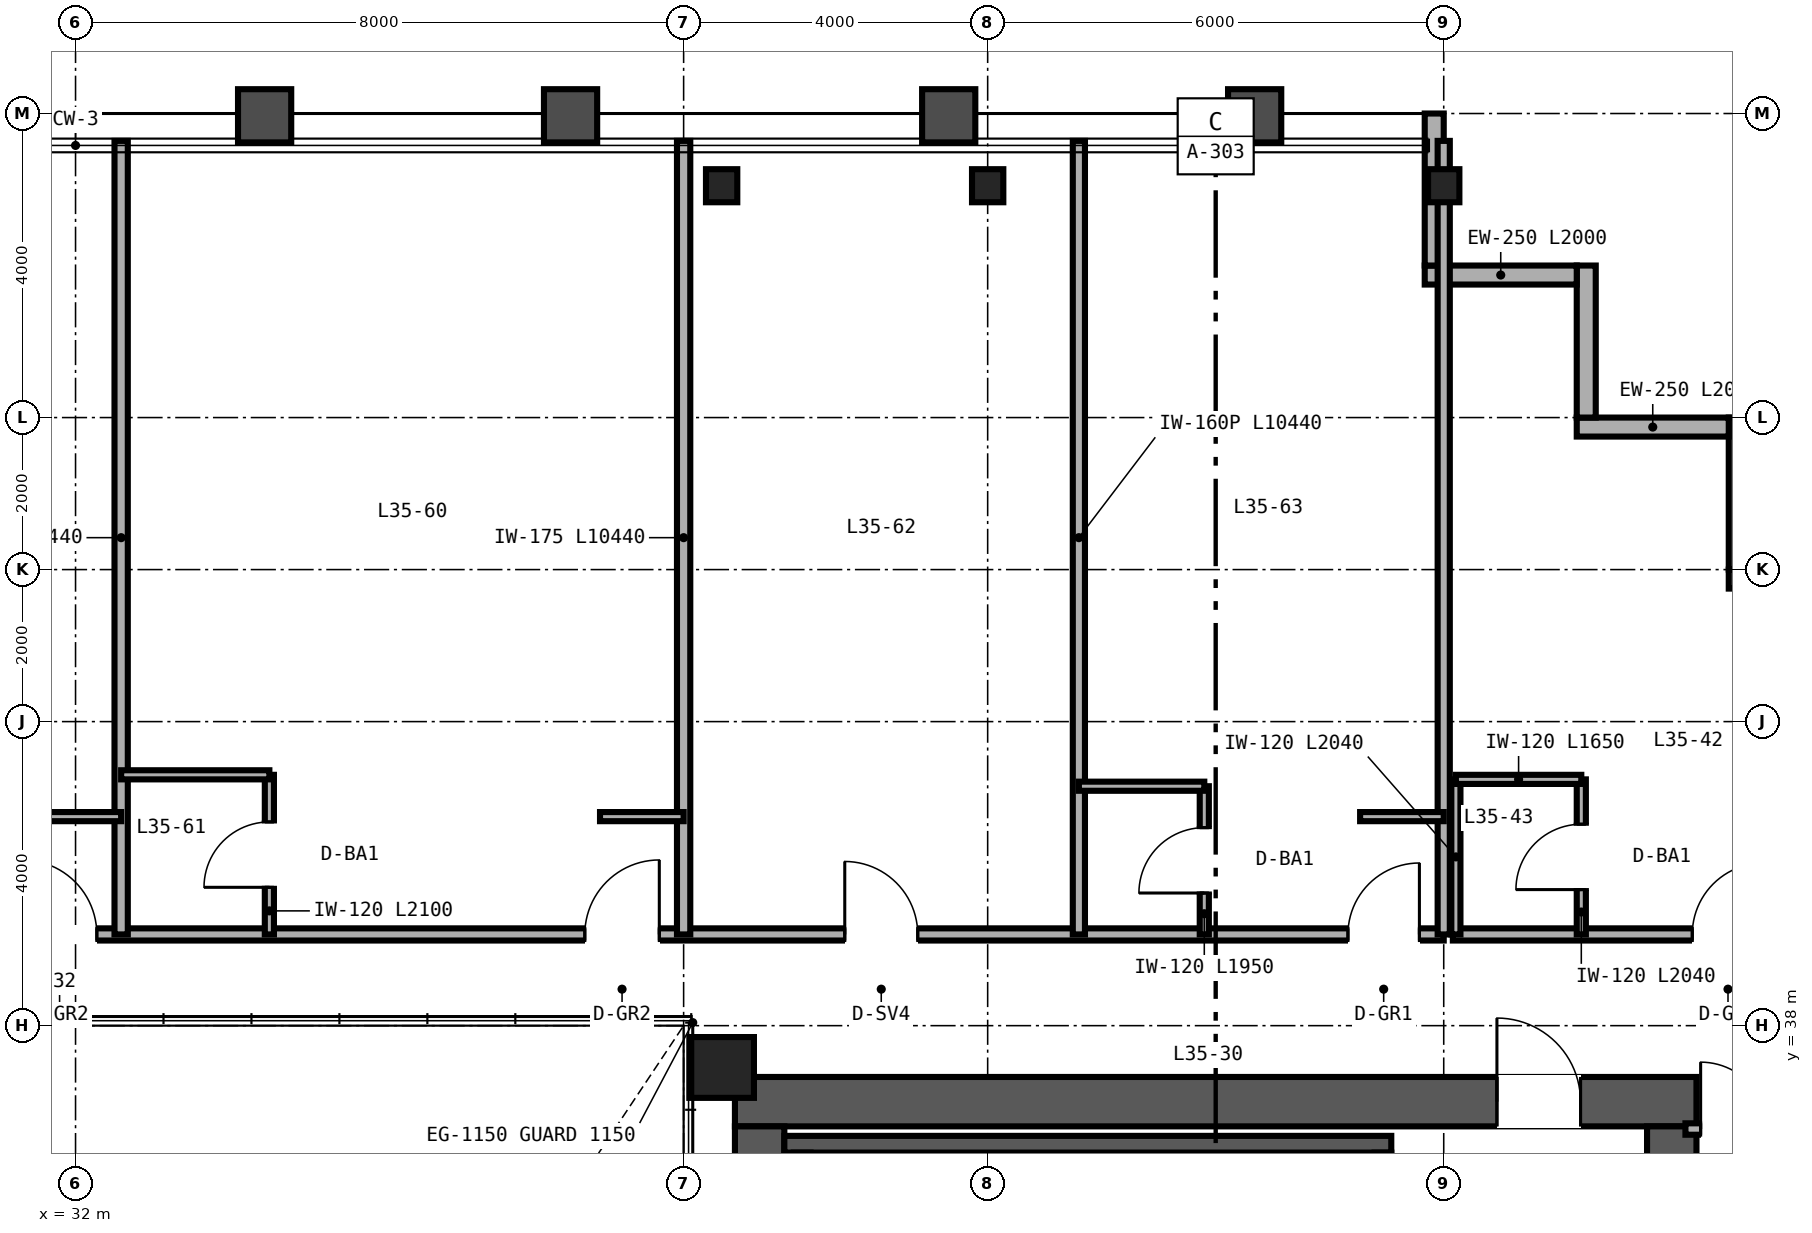
"""IFC4 building model, lengths in metres.
Left out: names, types, materials, properties, quantities, classifications, styles, units other than length and angle.
Written with IfcOpenShell. Run it as: python <this file> out.ifc"""

import sys

from ifc_helpers import new_model, si_unit, direction, frame, frame_2d, origin, origin_2d, place, context, subcontext, project, spatial, rectangle, hollow_rectangle, i_section, extrude, source, transform, mapped, element, fill, save


model = new_model("IFC4")
c1 = context("Model", 3, precision=1e-05, world=origin(), true_north=direction((0.0, 1.0)))
c2 = subcontext(c1, "Body", "Model", "MODEL_VIEW")
j1 = project(units=[si_unit("LENGTHUNIT", "METRE"), si_unit("PLANEANGLEUNIT", "RADIAN")], contexts=[c1])
p1 = place(None, origin())
s1 = spatial("IfcSite", under=j1, at=p1, CompositionType="ELEMENT")
p2 = place(p1, origin())
s2 = spatial("IfcBuilding", under=s1, at=p2, CompositionType="ELEMENT")
p3 = place(p2, frame((0.0, 0.0, 140.4)))
s3 = spatial("IfcBuildingStorey", under=s2, at=p3, CompositionType="ELEMENT", Elevation=140.4)
p4 = place(p3, frame((40.675, 37.0, 0.0), z_axis=(0.0, 0.0, 1.0), x_axis=(1.0, 0.0, 0.0)))
e1 = element("IfcWall", 1, at=p4, inside=s3, PredefinedType="SHEAR", context=c2, shape_type="SweptSolid", body=[
    extrude(rectangle(XDim=12.65, YDim=0.65, at=frame_2d((6.325, 0.0))), origin(), (0.0, 0.0, 1.0), 3.36),
])
p5 = place(p4, frame((10.025, 0.0, 0.0)))
e2 = element("IfcOpeningElement", 2, at=p5, cuts=e1, PredefinedType="OPENING", context=c2, shape_type="SweptSolid", body=[
    extrude(rectangle(XDim=1.1, YDim=2.15, at=frame_2d((0.55, 1.075))), frame((0.0, 0.335, 0.0), z_axis=(0.0, -1.0, 0.0), x_axis=(1.0, 0.0, 0.0)), (0.0, 0.0, 1.0), 0.67),
])
for number, where, z_axis, x_axis in (
    (3, (41.0, 15.325, 0.0), (0.0, 0.0, 1.0), (0.0, 1.0, 0.0)),
    (4, (53.0, 15.325, 0.0), (0.0, 0.0, 1.0), (0.0, 1.0, 0.0)),
):
    element("IfcWall", number, at=place(p3, frame(where, z_axis=z_axis, x_axis=x_axis)), inside=s3, PredefinedType="SHEAR", context=c2, shape_type="SweptSolid", body=[
        extrude(rectangle(XDim=21.35, YDim=0.65, at=frame_2d((10.675, 0.0))), origin(), (0.0, 0.0, 1.0), 3.36),
    ])
p6 = place(p3, frame((41.325, 36.44, 0.0), z_axis=(0.0, 0.0, 1.0), x_axis=(1.0, 0.0, 0.0)))
e5 = element("IfcWall", 5, at=p6, inside=s3, PredefinedType="SHEAR", context=c2, shape_type="SweptSolid", body=[
    extrude(rectangle(XDim=7.985, YDim=0.22, at=frame_2d((3.993, 0.0))), origin(), (0.0, 0.0, 1.0), 3.4),
])
for number, where, z_axis, x_axis in (
    (6, (41.56, 33.05, 0.0), (0.0, 0.0, 1.0), (0.0, 1.0, 0.0)),
    (7, (49.2, 33.05, 0.0), (0.0, 0.0, 1.0), (0.0, 1.0, 0.0)),
):
    element("IfcWall", number, at=place(p3, frame(where, z_axis=z_axis, x_axis=x_axis)), inside=s3, PredefinedType="SHEAR", context=c2, shape_type="SweptSolid", body=[
        extrude(rectangle(XDim=3.28, YDim=0.22, at=frame_2d((1.64, 0.0))), origin(), (0.0, 0.0, 1.0), 3.4),
    ])
m1 = source(origin(), c2, "Body", "SweptSolid", [
    extrude(hollow_rectangle(XDim=0.85, YDim=0.8, WallThickness=0.032, at=origin_2d()), origin(), (0.0, 0.0, 1.0), 3.36),
])
p7 = place(p3, frame((40.5, 37.45, 0.0), z_axis=(0.0, 0.0, 1.0), x_axis=(1.0, 0.0, 0.0)))
e8 = element("IfcColumn", 8, at=p7, inside=s3, PredefinedType="COLUMN", context=c2, shape_type="MappedRepresentation", body=[
    mapped(m1, transform((0.0, 0.0, 0.0), scale=1.0)),
])
m2 = source(origin(), c2, "Body", "SweptSolid", [
    extrude(i_section(OverallWidth=0.412, OverallDepth=0.435, WebThickness=0.036, FlangeThickness=0.057, FilletRadius=0.025, at=origin_2d()), origin(), (0.0, 0.0, 1.0), 3.36),
])
for number, where, z_axis, x_axis in (
    (9, (40.5, 49.05, 0.0), (0.0, 0.0, 1.0), (1.0, 0.0, 0.0)),
    (10, (44.0, 49.05, 0.0), (0.0, 0.0, 1.0), (1.0, 0.0, 0.0)),
    (11, (50.0, 49.05, 0.0), (0.0, 0.0, 1.0), (1.0, 0.0, 0.0)),
):
    element("IfcColumn", number, at=place(p3, frame(where, z_axis=z_axis, x_axis=x_axis)), inside=s3, PredefinedType="COLUMN", context=c2, shape_type="MappedRepresentation", body=[
        mapped(m2, transform((0.0, 0.0, 0.0), scale=1.0)),
    ])
p8 = place(p3, frame((56.0, 43.875, 0.0), z_axis=(0.0, 0.0, 1.0), x_axis=(-1.0, 0.0, 0.0)))
e12 = element("IfcWall", 12, at=p8, inside=s3, PredefinedType="SOLIDWALL", context=c2, shape_type="SweptSolid", body=[
    extrude(rectangle(XDim=2.25, YDim=0.25, at=frame_2d((1.125, 0.0))), origin(), (0.0, 0.0, 1.0), 3.36),
])
for number, where, z_axis, x_axis in (
    (13, (53.875, 44.0, 0.0), (0.0, 0.0, 1.0), (0.0, 1.0, 0.0)),
    (14, (53.75, 45.875, 0.0), (0.0, 0.0, 1.0), (-1.0, 0.0, 0.0)),
    (15, (51.875, 46.0, 0.0), (0.0, 0.0, 1.0), (0.0, 1.0, 0.0)),
    (16, (51.75, 47.875, 0.0), (0.0, 0.0, 1.0), (-1.0, 0.0, 0.0)),
):
    element("IfcWall", number, at=place(p3, frame(where, z_axis=z_axis, x_axis=x_axis)), inside=s3, PredefinedType="SOLIDWALL", context=c2, shape_type="SweptSolid", body=[
        extrude(rectangle(XDim=2.0, YDim=0.25, at=frame_2d((1.0, 0.0))), origin(), (0.0, 0.0, 1.0), 3.36),
    ])
p9 = place(p3, frame((49.875, 48.0, 0.0), z_axis=(0.0, 0.0, 1.0), x_axis=(0.0, 1.0, 0.0)))
e17 = element("IfcWall", 17, at=p9, inside=s3, PredefinedType="SOLIDWALL", context=c2, shape_type="SweptSolid", body=[
    extrude(rectangle(XDim=2.0, YDim=0.25, at=frame_2d((1.0, 0.0))), origin(), (0.0, 0.0, 1.0), 2.667),
])
p10 = place(p3, frame((53.18, 36.64, 0.0), z_axis=(0.0, 0.0, 1.0), x_axis=(1.0, 0.0, 0.0)))
e18 = element("IfcWall", 18, at=p10, inside=s3, PredefinedType="PARTITIONING", context=c2, shape_type="SweptSolid", body=[
    extrude(rectangle(XDim=2.66, YDim=0.15, at=frame_2d((1.33, 0.0))), origin(), (0.0, 0.0, 1.0), 2.743),
])
p11 = place(p10, frame((0.2, 0.0, 0.0)))
e19 = element("IfcOpeningElement", 19, at=p11, cuts=e18, PredefinedType="OPENING", context=c2, shape_type="SweptSolid", body=[
    extrude(rectangle(XDim=0.88, YDim=2.15, at=frame_2d((0.44, 1.075))), frame((0.0, 0.085, 0.0), z_axis=(0.0, -1.0, 0.0), x_axis=(1.0, 0.0, 0.0)), (0.0, 0.0, 1.0), 0.17),
])
p12 = place(p3, frame((50.12, 39.2, 0.0), z_axis=(0.0, 0.0, 1.0), x_axis=(1.0, 0.0, 0.0)))
e20 = element("IfcWall", 20, at=p12, inside=s3, PredefinedType="PARTITIONING", context=c2, shape_type="SweptSolid", body=[
    extrude(rectangle(XDim=5.68, YDim=0.16, at=frame_2d((2.84, 0.0))), origin(), (0.0, 0.0, 1.0), 3.36),
])
p13 = place(p12, frame((3.15, 0.0, 0.0)))
e21 = element("IfcOpeningElement", 21, at=p13, cuts=e20, PredefinedType="OPENING", context=c2, shape_type="SweptSolid", body=[
    extrude(rectangle(XDim=0.94, YDim=2.15, at=frame_2d((0.47, 1.075))), frame((0.0, 0.09, 0.0), z_axis=(0.0, -1.0, 0.0), x_axis=(1.0, 0.0, 0.0)), (0.0, 0.0, 1.0), 0.18),
])
p14 = place(p3, frame((51.81, 39.2, 0.0), z_axis=(0.0, 0.0, 1.0), x_axis=(0.0, 1.0, 0.0)))
e22 = element("IfcWall", 22, at=p14, inside=s3, PredefinedType="PARTITIONING", context=c2, shape_type="SweptSolid", body=[
    extrude(rectangle(XDim=2.04, YDim=0.12, at=frame_2d((1.02, 0.0))), origin(), (0.0, 0.0, 1.0), 3.36),
])
p15 = place(p14, frame((0.59, 0.0, 0.0)))
e23 = element("IfcOpeningElement", 23, at=p15, cuts=e22, PredefinedType="OPENING", context=c2, shape_type="SweptSolid", body=[
    extrude(rectangle(XDim=0.86, YDim=2.1, at=frame_2d((0.43, 1.05))), frame((0.0, 0.07, 0.0), z_axis=(0.0, -1.0, 0.0), x_axis=(1.0, 0.0, 0.0)), (0.0, 0.0, 1.0), 0.14),
])
p16 = place(p3, frame((50.16, 39.2, 0.0), z_axis=(0.0, 0.0, 1.0), x_axis=(0.0, 1.0, 0.0)))
e24 = element("IfcWall", 24, at=p16, inside=s3, PredefinedType="PARTITIONING", context=c2, shape_type="SweptSolid", body=[
    extrude(rectangle(XDim=2.04, YDim=0.12, at=frame_2d((1.02, 0.0))), origin(), (0.0, 0.0, 1.0), 3.36),
])
p17 = place(p3, frame((50.16, 41.24, 0.0), z_axis=(0.0, 0.0, 1.0), x_axis=(1.0, 0.0, 0.0)))
e25 = element("IfcWall", 25, at=p17, inside=s3, PredefinedType="PARTITIONING", context=c2, shape_type="SweptSolid", body=[
    extrude(rectangle(XDim=1.65, YDim=0.12, at=frame_2d((0.825, 0.0))), origin(), (0.0, 0.0, 1.0), 3.36),
])
p18 = place(p3, frame((14.0, 39.2, 0.0), z_axis=(0.0, 0.0, 1.0), x_axis=(1.0, 0.0, 0.0)))
e26 = element("IfcWall", 26, at=p18, inside=s3, PredefinedType="PARTITIONING", context=c2, shape_type="SweptSolid", body=[
    extrude(rectangle(XDim=36.0, YDim=0.16, at=frame_2d((18.0, 0.0))), origin(), (0.0, 0.0, 1.0), 2.581),
])
p19 = place(p18, frame((4.34, 0.0, 0.0)))
e27 = element("IfcOpeningElement", 27, at=p19, cuts=e26, PredefinedType="OPENING", context=c2, shape_type="SweptSolid", body=[
    extrude(rectangle(XDim=0.94, YDim=2.15, at=frame_2d((0.47, 1.075))), frame((0.0, 0.09, 0.0), z_axis=(0.0, -1.0, 0.0), x_axis=(1.0, 0.0, 0.0)), (0.0, 0.0, 1.0), 0.18),
])
p20 = place(p18, frame((9.94, 0.0, 0.0)))
e28 = element("IfcOpeningElement", 28, at=p20, cuts=e26, PredefinedType="OPENING", context=c2, shape_type="SweptSolid", body=[
    extrude(rectangle(XDim=0.94, YDim=2.15, at=frame_2d((0.47, 1.075))), frame((0.0, 0.09, 0.0), z_axis=(0.0, -1.0, 0.0), x_axis=(1.0, 0.0, 0.0)), (0.0, 0.0, 1.0), 0.18),
])
p21 = place(p18, frame((17.3, 0.0, 0.0)))
e29 = element("IfcOpeningElement", 29, at=p21, cuts=e26, PredefinedType="OPENING", context=c2, shape_type="SweptSolid", body=[
    extrude(rectangle(XDim=0.98, YDim=2.2, at=frame_2d((0.49, 1.1))), frame((0.0, 0.09, 0.0), z_axis=(0.0, -1.0, 0.0), x_axis=(1.0, 0.0, 0.0)), (0.0, 0.0, 1.0), 0.18),
])
p22 = place(p18, frame((24.7, 0.0, 0.0)))
e30 = element("IfcOpeningElement", 30, at=p22, cuts=e26, PredefinedType="OPENING", context=c2, shape_type="SweptSolid", body=[
    extrude(rectangle(XDim=0.98, YDim=2.2, at=frame_2d((0.49, 1.1))), frame((0.0, 0.09, 0.0), z_axis=(0.0, -1.0, 0.0), x_axis=(1.0, 0.0, 0.0)), (0.0, 0.0, 1.0), 0.18),
])
p23 = place(p18, frame((28.12, 0.0, 0.0)))
e31 = element("IfcOpeningElement", 31, at=p23, cuts=e26, PredefinedType="OPENING", context=c2, shape_type="SweptSolid", body=[
    extrude(rectangle(XDim=0.96, YDim=2.15, at=frame_2d((0.48, 1.075))), frame((0.0, 0.09, 0.0), z_axis=(0.0, -1.0, 0.0), x_axis=(1.0, 0.0, 0.0)), (0.0, 0.0, 1.0), 0.18),
])
p24 = place(p18, frame((34.74, 0.0, 0.0)))
e32 = element("IfcOpeningElement", 32, at=p24, cuts=e26, PredefinedType="OPENING", context=c2, shape_type="SweptSolid", body=[
    extrude(rectangle(XDim=0.94, YDim=2.15, at=frame_2d((0.47, 1.075))), frame((0.0, 0.09, 0.0), z_axis=(0.0, -1.0, 0.0), x_axis=(1.0, 0.0, 0.0)), (0.0, 0.0, 1.0), 0.18),
])
p25 = place(p3, frame((50.0, 39.2, 0.0), z_axis=(0.0, 0.0, 1.0), x_axis=(0.0, 1.0, 0.0)))
e33 = element("IfcWall", 33, at=p25, inside=s3, PredefinedType="PARTITIONING", context=c2, shape_type="SweptSolid", body=[
    extrude(rectangle(XDim=10.44, YDim=0.16, at=frame_2d((5.22, 0.0))), origin(), (0.0, 0.0, 1.0), 2.667),
])
p26 = place(p3, frame((32.6, 39.2, 0.0), z_axis=(0.0, 0.0, 1.0), x_axis=(0.0, 1.0, 0.0)))
e34 = element("IfcWall", 34, at=p26, inside=s3, PredefinedType="PARTITIONING", context=c2, shape_type="SweptSolid", body=[
    extrude(rectangle(XDim=10.44, YDim=0.175, at=frame_2d((5.22, 0.0))), origin(), (0.0, 0.0, 1.0), 2.433),
])
p27 = place(p3, frame((31.5, 40.75, 0.0), z_axis=(0.0, 0.0, 1.0), x_axis=(1.0, 0.0, 0.0)))
e35 = element("IfcWall", 35, at=p27, inside=s3, PredefinedType="PARTITIONING", context=c2, shape_type="SweptSolid", body=[
    extrude(rectangle(XDim=1.1, YDim=0.12, at=frame_2d((0.55, 0.0))), origin(), (0.0, 0.0, 1.0), 3.36),
])
p28 = place(p3, frame((40.0, 39.2, 0.0), z_axis=(0.0, 0.0, 1.0), x_axis=(0.0, 1.0, 0.0)))
e36 = element("IfcWall", 36, at=p28, inside=s3, PredefinedType="PARTITIONING", context=c2, shape_type="SweptSolid", body=[
    extrude(rectangle(XDim=10.44, YDim=0.175, at=frame_2d((5.22, 0.0))), origin(), (0.0, 0.0, 1.0), 2.433),
])
p29 = place(p3, frame((34.55, 39.2, 0.0), z_axis=(0.0, 0.0, 1.0), x_axis=(0.0, 1.0, 0.0)))
e37 = element("IfcWall", 37, at=p29, inside=s3, PredefinedType="PARTITIONING", context=c2, shape_type="SweptSolid", body=[
    extrude(rectangle(XDim=2.1, YDim=0.12, at=frame_2d((1.05, 0.0))), origin(), (0.0, 0.0, 1.0), 3.36),
])
p30 = place(p29, frame((0.62, 0.0, 0.0)))
e38 = element("IfcOpeningElement", 38, at=p30, cuts=e37, PredefinedType="OPENING", context=c2, shape_type="SweptSolid", body=[
    extrude(rectangle(XDim=0.86, YDim=2.1, at=frame_2d((0.43, 1.05))), frame((0.0, 0.07, 0.0), z_axis=(0.0, -1.0, 0.0), x_axis=(1.0, 0.0, 0.0)), (0.0, 0.0, 1.0), 0.14),
])
p31 = place(p3, frame((32.6, 41.3, 0.0), z_axis=(0.0, 0.0, 1.0), x_axis=(1.0, 0.0, 0.0)))
e39 = element("IfcWall", 39, at=p31, inside=s3, PredefinedType="PARTITIONING", context=c2, shape_type="SweptSolid", body=[
    extrude(rectangle(XDim=1.95, YDim=0.12, at=frame_2d((0.975, 0.0))), origin(), (0.0, 0.0, 1.0), 3.36),
])
p32 = place(p3, frame((38.9, 40.75, 0.0), z_axis=(0.0, 0.0, 1.0), x_axis=(1.0, 0.0, 0.0)))
e40 = element("IfcWall", 40, at=p32, inside=s3, PredefinedType="PARTITIONING", context=c2, shape_type="SweptSolid", body=[
    extrude(rectangle(XDim=1.1, YDim=0.12, at=frame_2d((0.55, 0.0))), origin(), (0.0, 0.0, 1.0), 3.36),
])
p33 = place(p3, frame((45.2, 39.2, 0.0), z_axis=(0.0, 0.0, 1.0), x_axis=(0.0, 1.0, 0.0)))
e41 = element("IfcWall", 41, at=p33, inside=s3, PredefinedType="PARTITIONING", context=c2, shape_type="SweptSolid", body=[
    extrude(rectangle(XDim=10.44, YDim=0.16, at=frame_2d((5.22, 0.0))), origin(), (0.0, 0.0, 1.0), 2.667),
])
p34 = place(p3, frame((46.85, 39.2, 0.0), z_axis=(0.0, 0.0, 1.0), x_axis=(0.0, 1.0, 0.0)))
e42 = element("IfcWall", 42, at=p34, inside=s3, PredefinedType="PARTITIONING", context=c2, shape_type="SweptSolid", body=[
    extrude(rectangle(XDim=1.95, YDim=0.12, at=frame_2d((0.975, 0.0))), origin(), (0.0, 0.0, 1.0), 3.36),
])
p35 = place(p34, frame((0.545, 0.0, 0.0)))
e43 = element("IfcOpeningElement", 43, at=p35, cuts=e42, PredefinedType="OPENING", context=c2, shape_type="SweptSolid", body=[
    extrude(rectangle(XDim=0.86, YDim=2.1, at=frame_2d((0.43, 1.05))), frame((0.0, 0.07, 0.0), z_axis=(0.0, -1.0, 0.0), x_axis=(1.0, 0.0, 0.0)), (0.0, 0.0, 1.0), 0.14),
])
p36 = place(p3, frame((45.2, 41.15, 0.0), z_axis=(0.0, 0.0, 1.0), x_axis=(1.0, 0.0, 0.0)))
e44 = element("IfcWall", 44, at=p36, inside=s3, PredefinedType="PARTITIONING", context=c2, shape_type="SweptSolid", body=[
    extrude(rectangle(XDim=1.65, YDim=0.12, at=frame_2d((0.825, 0.0))), origin(), (0.0, 0.0, 1.0), 3.36),
])
p37 = place(p3, frame((48.9, 40.75, 0.0), z_axis=(0.0, 0.0, 1.0), x_axis=(1.0, 0.0, 0.0)))
e45 = element("IfcWall", 45, at=p37, inside=s3, PredefinedType="PARTITIONING", context=c2, shape_type="SweptSolid", body=[
    extrude(rectangle(XDim=1.1, YDim=0.12, at=frame_2d((0.55, 0.0))), origin(), (0.0, 0.0, 1.0), 3.36),
])
m3 = source(origin(), c2, "Body", "SweptSolid", [
    extrude(rectangle(XDim=1.1, YDim=2.15, at=frame_2d((0.55, 1.075))), frame((0.0, 0.025, 0.0), z_axis=(0.0, -1.0, 0.0), x_axis=(1.0, 0.0, 0.0)), (0.0, 0.0, 1.0), 0.05),
])
p38 = place(p5, origin())
e46 = element("IfcDoor", 46, at=p38, inside=s3, OperationType="SINGLE_SWING_LEFT", PredefinedType="DOOR", context=c2, shape_type="MappedRepresentation", body=[
    mapped(m3, transform((0.0, 0.0, 0.0), scale=1.0)),
])
fill(e2, e46)
m4 = source(origin(), c2, "Body", "SweptSolid", [
    extrude(rectangle(XDim=0.88, YDim=2.15, at=frame_2d((0.44, 1.075))), frame((0.0, 0.025, 0.0), z_axis=(0.0, -1.0, 0.0), x_axis=(1.0, 0.0, 0.0)), (0.0, 0.0, 1.0), 0.05),
])
p39 = place(p11, origin())
e47 = element("IfcDoor", 47, at=p39, inside=s3, OperationType="SINGLE_SWING_LEFT", PredefinedType="DOOR", context=c2, shape_type="MappedRepresentation", body=[
    mapped(m4, transform((0.0, 0.0, 0.0), scale=1.0)),
])
fill(e19, e47)
m5 = source(origin(), c2, "Body", "SweptSolid", [
    extrude(rectangle(XDim=0.86, YDim=2.1, at=frame_2d((0.43, 1.05))), frame((0.0, 0.025, 0.0), z_axis=(0.0, -1.0, 0.0), x_axis=(1.0, 0.0, 0.0)), (0.0, 0.0, 1.0), 0.05),
])
p40 = place(p15, origin())
e48 = element("IfcDoor", 48, at=p40, inside=s3, OperationType="SINGLE_SWING_LEFT", PredefinedType="DOOR", context=c2, shape_type="MappedRepresentation", body=[
    mapped(m5, transform((0.0, 0.0, 0.0), scale=1.0)),
])
fill(e23, e48)
m6 = source(origin(), c2, "Body", "SweptSolid", [
    extrude(rectangle(XDim=0.94, YDim=2.15, at=frame_2d((0.47, 1.075))), frame((0.0, 0.025, 0.0), z_axis=(0.0, -1.0, 0.0), x_axis=(1.0, 0.0, 0.0)), (0.0, 0.0, 1.0), 0.05),
])
p41 = place(p13, origin())
e49 = element("IfcDoor", 49, at=p41, inside=s3, OperationType="SINGLE_SWING_RIGHT", PredefinedType="DOOR", context=c2, shape_type="MappedRepresentation", body=[
    mapped(m6, transform((0.0, 0.0, 0.0), scale=1.0)),
])
fill(e21, e49)
p42 = place(p30, origin())
e50 = element("IfcDoor", 50, at=p42, inside=s3, OperationType="SINGLE_SWING_LEFT", PredefinedType="DOOR", context=c2, shape_type="MappedRepresentation", body=[
    mapped(m5, transform((0.0, 0.0, 0.0), scale=1.0)),
])
fill(e38, e50)
p43 = place(p35, origin())
e51 = element("IfcDoor", 51, at=p43, inside=s3, OperationType="SINGLE_SWING_LEFT", PredefinedType="DOOR", context=c2, shape_type="MappedRepresentation", body=[
    mapped(m5, transform((0.0, 0.0, 0.0), scale=1.0)),
])
fill(e43, e51)
m7 = source(origin(), c2, "Body", "SweptSolid", [
    extrude(rectangle(XDim=0.98, YDim=2.2, at=frame_2d((0.49, 1.1))), frame((0.0, 0.025, 0.0), z_axis=(0.0, -1.0, 0.0), x_axis=(1.0, 0.0, 0.0)), (0.0, 0.0, 1.0), 0.05),
])
p44 = place(p21, origin())
e52 = element("IfcDoor", 52, at=p44, inside=s3, OperationType="SINGLE_SWING_LEFT", PredefinedType="DOOR", context=c2, shape_type="MappedRepresentation", body=[
    mapped(m7, transform((0.0, 0.0, 0.0), scale=1.0)),
])
fill(e29, e52)
p45 = place(p22, origin())
e53 = element("IfcDoor", 53, at=p45, inside=s3, OperationType="SINGLE_SWING_RIGHT", PredefinedType="DOOR", context=c2, shape_type="MappedRepresentation", body=[
    mapped(m7, transform((0.0, 0.0, 0.0), scale=1.0)),
])
fill(e30, e53)
m8 = source(origin(), c2, "Body", "SweptSolid", [
    extrude(rectangle(XDim=0.96, YDim=2.15, at=frame_2d((0.48, 1.075))), frame((0.0, 0.025, 0.0), z_axis=(0.0, -1.0, 0.0), x_axis=(1.0, 0.0, 0.0)), (0.0, 0.0, 1.0), 0.05),
])
p46 = place(p23, origin())
e54 = element("IfcDoor", 54, at=p46, inside=s3, OperationType="SINGLE_SWING_LEFT", PredefinedType="DOOR", context=c2, shape_type="MappedRepresentation", body=[
    mapped(m8, transform((0.0, 0.0, 0.0), scale=1.0)),
])
fill(e31, e54)
p47 = place(p24, origin())
e55 = element("IfcDoor", 55, at=p47, inside=s3, OperationType="SINGLE_SWING_RIGHT", PredefinedType="DOOR", context=c2, shape_type="MappedRepresentation", body=[
    mapped(m6, transform((0.0, 0.0, 0.0), scale=1.0)),
])
fill(e32, e55)
save(model, sys.argv[1])
